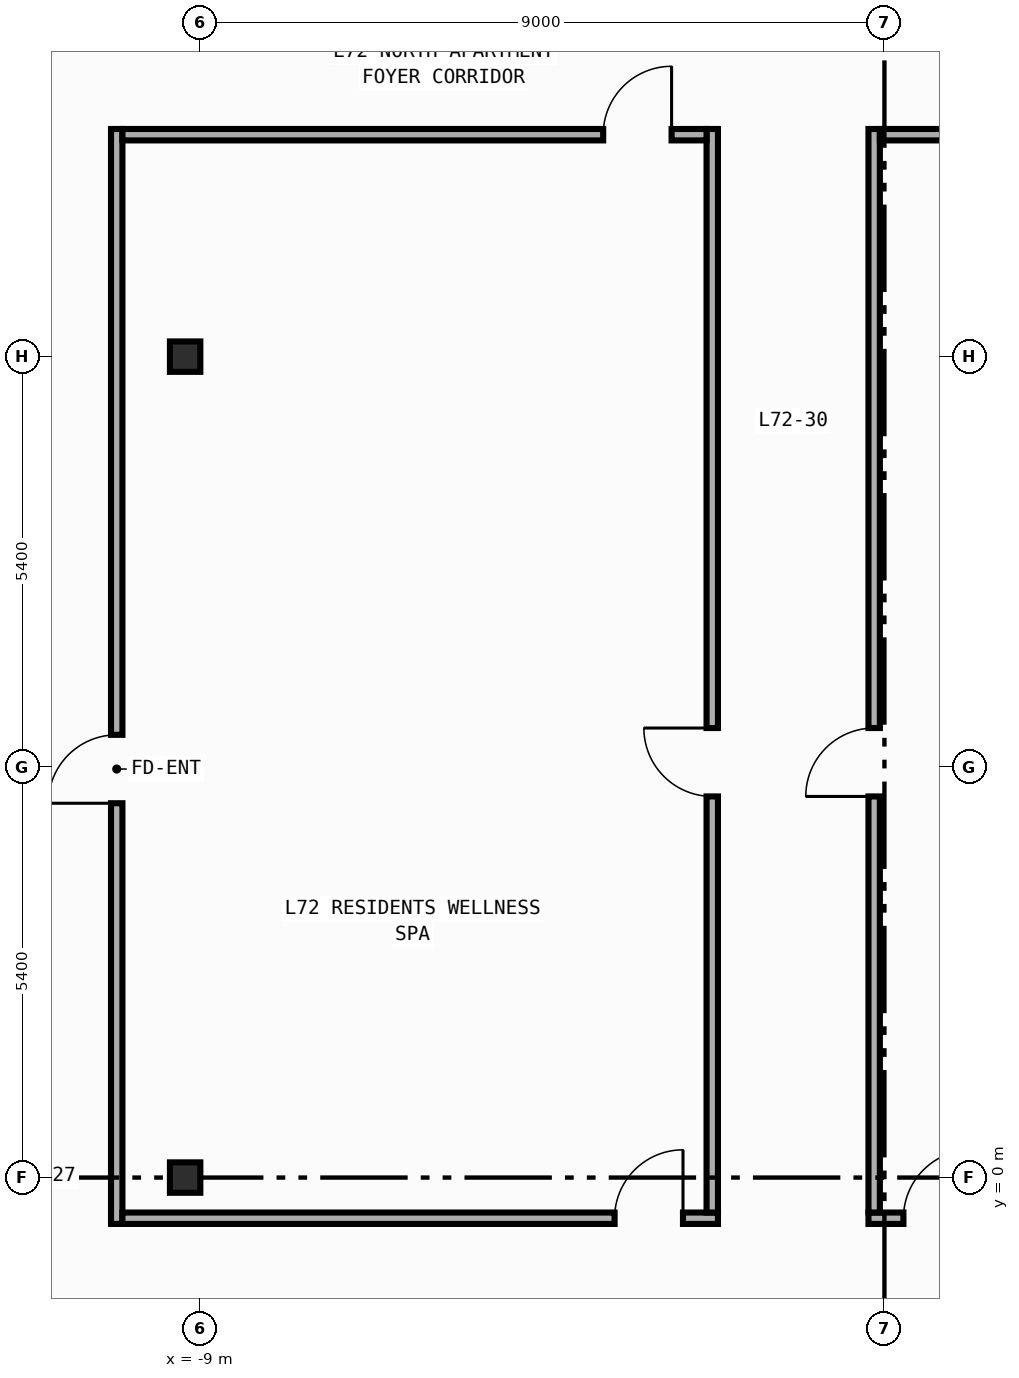
"""IFC4 building model, lengths in metres.
Left out: names, types, materials, properties, quantities, classifications, styles, units other than length and angle.
Written with IfcOpenShell. Run it as: python <this file> out.ifc"""

import sys

from ifc_helpers import new_model, si_unit, direction, frame, frame_2d, origin, origin_2d, place, context, subcontext, project, spatial, rectangle, i_section, extrude, element, fill, save


model = new_model("IFC4")
c1 = context("Model", 3, precision=1e-05, world=origin(), true_north=direction((0.0, 1.0)))
c2 = subcontext(c1, "Body", "Model", "MODEL_VIEW")
j1 = project(units=[si_unit("LENGTHUNIT", "METRE"), si_unit("PLANEANGLEUNIT", "RADIAN")], contexts=[c1])
p1 = place(None, origin())
s1 = spatial("IfcSite", under=j1, at=p1, CompositionType="ELEMENT")
p2 = place(p1, origin())
s2 = spatial("IfcBuilding", under=s1, at=p2, CompositionType="ELEMENT")
p3 = place(p2, frame((0.0, 0.0, 300.4)))
s3 = spatial("IfcBuildingStorey", under=s2, at=p3, CompositionType="ELEMENT", Elevation=300.4)
for number, where, z_axis, x_axis in (
    (1, (-9.2, 0.0, 0.0), (0.0, 0.0, 1.0), (1.0, 0.0, 0.0)),
    (2, (-9.2, 10.8, 0.0), (0.0, 0.0, 1.0), (1.0, 0.0, 0.0)),
):
    element("IfcColumn", number, at=place(p3, frame(where, z_axis=z_axis, x_axis=x_axis)), inside=s3, PredefinedType="COLUMN", context=c2, shape_type="SweptSolid", body=[
        extrude(i_section(OverallWidth=0.4, OverallDepth=0.4, WebThickness=0.013, FlangeThickness=0.021, FilletRadius=0.022, at=origin_2d()), origin(), (0.0, 0.0, 1.0), 3.8),
    ])
p4 = place(p3, frame((-10.1, -0.61, 0.0), z_axis=(0.0, 0.0, 1.0), x_axis=(0.0, 1.0, 0.0)))
e3 = element("IfcWall", 3, at=p4, inside=s3, PredefinedType="PARTITIONING", context=c2, shape_type="SweptSolid", body=[
    extrude(rectangle(XDim=14.405, YDim=0.15, at=frame_2d((7.203, 0.0))), origin(), (0.0, 0.0, 1.0), 3.54),
])
p5 = place(p4, frame((5.535, 0.0, 0.0)))
e4 = element("IfcOpeningElement", 4, at=p5, cuts=e3, PredefinedType="OPENING", context=c2, shape_type="SweptSolid", body=[
    extrude(rectangle(XDim=0.9, YDim=2.15, at=frame_2d((0.45, 1.075))), frame((0.0, 0.085, 0.0), z_axis=(0.0, -1.0, 0.0), x_axis=(1.0, 0.0, 0.0)), (0.0, 0.0, 1.0), 0.17),
])
p6 = place(p3, frame((-10.025, -0.535, 0.0), z_axis=(0.0, 0.0, 1.0), x_axis=(1.0, 0.0, 0.0)))
e5 = element("IfcWall", 5, at=p6, inside=s3, PredefinedType="PARTITIONING", context=c2, shape_type="SweptSolid", body=[
    extrude(rectangle(XDim=7.835, YDim=0.15, at=frame_2d((3.917, 0.0))), origin(), (0.0, 0.0, 1.0), 3.54),
])
p7 = place(p6, frame((6.475, 0.0, 0.0)))
e6 = element("IfcOpeningElement", 6, at=p7, cuts=e5, PredefinedType="OPENING", context=c2, shape_type="SweptSolid", body=[
    extrude(rectangle(XDim=0.9, YDim=2.15, at=frame_2d((0.45, 1.075))), frame((0.0, 0.085, 0.0), z_axis=(0.0, -1.0, 0.0), x_axis=(1.0, 0.0, 0.0)), (0.0, 0.0, 1.0), 0.17),
])
p8 = place(p3, frame((-0.21, -0.535, 0.0), z_axis=(0.0, 0.0, 1.0), x_axis=(1.0, 0.0, 0.0)))
e7 = element("IfcWall", 7, at=p8, inside=s3, PredefinedType="PARTITIONING", context=c2, shape_type="SweptSolid", body=[
    extrude(rectangle(XDim=10.235, YDim=0.15, at=frame_2d((5.117, 0.0))), origin(), (0.0, 0.0, 1.0), 3.54),
])
p9 = place(p8, frame((0.46, 0.0, 0.0)))
e8 = element("IfcOpeningElement", 8, at=p9, cuts=e7, PredefinedType="OPENING", context=c2, shape_type="SweptSolid", body=[
    extrude(rectangle(XDim=0.9, YDim=2.15, at=frame_2d((0.45, 1.075))), frame((0.0, 0.085, 0.0), z_axis=(0.0, -1.0, 0.0), x_axis=(1.0, 0.0, 0.0)), (0.0, 0.0, 1.0), 0.17),
])
p10 = place(p3, frame((-2.265, -0.46, 0.0), z_axis=(0.0, 0.0, 1.0), x_axis=(0.0, 1.0, 0.0)))
e9 = element("IfcWall", 9, at=p10, inside=s3, PredefinedType="PARTITIONING", context=c2, shape_type="SweptSolid", body=[
    extrude(rectangle(XDim=14.255, YDim=0.15, at=frame_2d((7.127, 0.0))), origin(), (0.0, 0.0, 1.0), 3.54),
])
p11 = place(p10, frame((5.474, 0.0, 0.0)))
e10 = element("IfcOpeningElement", 10, at=p11, cuts=e9, PredefinedType="OPENING", context=c2, shape_type="SweptSolid", body=[
    extrude(rectangle(XDim=0.9, YDim=2.15, at=frame_2d((0.45, 1.075))), frame((0.0, 0.085, 0.0), z_axis=(0.0, -1.0, 0.0), x_axis=(1.0, 0.0, 0.0)), (0.0, 0.0, 1.0), 0.17),
])
p12 = place(p3, frame((-0.135, -0.46, 0.0), z_axis=(0.0, 0.0, 1.0), x_axis=(0.0, 1.0, 0.0)))
e11 = element("IfcWall", 11, at=p12, inside=s3, PredefinedType="PARTITIONING", context=c2, shape_type="SweptSolid", body=[
    extrude(rectangle(XDim=14.255, YDim=0.15, at=frame_2d((7.127, 0.0))), origin(), (0.0, 0.0, 1.0), 3.54),
])
p13 = place(p12, frame((5.474, 0.0, 0.0)))
e12 = element("IfcOpeningElement", 12, at=p13, cuts=e11, PredefinedType="OPENING", context=c2, shape_type="SweptSolid", body=[
    extrude(rectangle(XDim=0.9, YDim=2.15, at=frame_2d((0.45, 1.075))), frame((0.0, 0.085, 0.0), z_axis=(0.0, -1.0, 0.0), x_axis=(1.0, 0.0, 0.0)), (0.0, 0.0, 1.0), 0.17),
])
p14 = place(p3, frame((-10.025, 13.72, 0.0), z_axis=(0.0, 0.0, 1.0), x_axis=(1.0, 0.0, 0.0)))
e13 = element("IfcWall", 13, at=p14, inside=s3, PredefinedType="PARTITIONING", context=c2, shape_type="SweptSolid", body=[
    extrude(rectangle(XDim=7.685, YDim=0.15, at=frame_2d((3.842, 0.0))), origin(), (0.0, 0.0, 1.0), 3.54),
])
p15 = place(p14, frame((6.325, 0.0, 0.0)))
e14 = element("IfcOpeningElement", 14, at=p15, cuts=e13, PredefinedType="OPENING", context=c2, shape_type="SweptSolid", body=[
    extrude(rectangle(XDim=0.9, YDim=2.15, at=frame_2d((0.45, 1.075))), frame((0.0, 0.085, 0.0), z_axis=(0.0, -1.0, 0.0), x_axis=(1.0, 0.0, 0.0)), (0.0, 0.0, 1.0), 0.17),
])
p16 = place(p3, frame((-0.06, 13.72, 0.0), z_axis=(0.0, 0.0, 1.0), x_axis=(1.0, 0.0, 0.0)))
e15 = element("IfcWall", 15, at=p16, inside=s3, PredefinedType="PARTITIONING", context=c2, shape_type="SweptSolid", body=[
    extrude(rectangle(XDim=10.085, YDim=0.15, at=frame_2d((5.042, 0.0))), origin(), (0.0, 0.0, 1.0), 3.54),
])
p17 = place(p16, frame((1.875, 0.0, 0.0)))
e16 = element("IfcOpeningElement", 16, at=p17, cuts=e15, PredefinedType="OPENING", context=c2, shape_type="SweptSolid", body=[
    extrude(rectangle(XDim=0.9, YDim=2.15, at=frame_2d((0.45, 1.075))), frame((0.0, 0.085, 0.0), z_axis=(0.0, -1.0, 0.0), x_axis=(1.0, 0.0, 0.0)), (0.0, 0.0, 1.0), 0.17),
])
p18 = place(p5, origin())
e17 = element("IfcDoor", 17, at=p18, inside=s3, OperationType="SINGLE_SWING_LEFT", PredefinedType="DOOR", context=c2, shape_type="SweptSolid", body=[
    extrude(rectangle(XDim=0.9, YDim=2.15, at=frame_2d((0.45, 1.075))), frame((0.0, 0.025, 0.0), z_axis=(0.0, -1.0, 0.0), x_axis=(1.0, 0.0, 0.0)), (0.0, 0.0, 1.0), 0.05),
])
fill(e4, e17)
p19 = place(p7, origin())
e18 = element("IfcDoor", 18, at=p19, inside=s3, OperationType="SINGLE_SWING_RIGHT", PredefinedType="DOOR", context=c2, shape_type="SweptSolid", body=[
    extrude(rectangle(XDim=0.9, YDim=2.15, at=frame_2d((0.45, 1.075))), frame((0.0, 0.025, 0.0), z_axis=(0.0, -1.0, 0.0), x_axis=(1.0, 0.0, 0.0)), (0.0, 0.0, 1.0), 0.05),
])
fill(e6, e18)
p20 = place(p9, origin())
e19 = element("IfcDoor", 19, at=p20, inside=s3, OperationType="SINGLE_SWING_RIGHT", PredefinedType="DOOR", context=c2, shape_type="SweptSolid", body=[
    extrude(rectangle(XDim=0.9, YDim=2.15, at=frame_2d((0.45, 1.075))), frame((0.0, 0.025, 0.0), z_axis=(0.0, -1.0, 0.0), x_axis=(1.0, 0.0, 0.0)), (0.0, 0.0, 1.0), 0.05),
])
fill(e8, e19)
p21 = place(p11, origin())
e20 = element("IfcDoor", 20, at=p21, inside=s3, OperationType="SINGLE_SWING_RIGHT", PredefinedType="DOOR", context=c2, shape_type="SweptSolid", body=[
    extrude(rectangle(XDim=0.9, YDim=2.15, at=frame_2d((0.45, 1.075))), frame((0.0, 0.025, 0.0), z_axis=(0.0, -1.0, 0.0), x_axis=(1.0, 0.0, 0.0)), (0.0, 0.0, 1.0), 0.05),
])
fill(e10, e20)
p22 = place(p13, origin())
e21 = element("IfcDoor", 21, at=p22, inside=s3, OperationType="SINGLE_SWING_LEFT", PredefinedType="DOOR", context=c2, shape_type="SweptSolid", body=[
    extrude(rectangle(XDim=0.9, YDim=2.15, at=frame_2d((0.45, 1.075))), frame((0.0, 0.025, 0.0), z_axis=(0.0, -1.0, 0.0), x_axis=(1.0, 0.0, 0.0)), (0.0, 0.0, 1.0), 0.05),
])
fill(e12, e21)
p23 = place(p15, origin())
e22 = element("IfcDoor", 22, at=p23, inside=s3, OperationType="SINGLE_SWING_RIGHT", PredefinedType="DOOR", context=c2, shape_type="SweptSolid", body=[
    extrude(rectangle(XDim=0.9, YDim=2.15, at=frame_2d((0.45, 1.075))), frame((0.0, 0.025, 0.0), z_axis=(0.0, -1.0, 0.0), x_axis=(1.0, 0.0, 0.0)), (0.0, 0.0, 1.0), 0.05),
])
fill(e14, e22)
save(model, sys.argv[1])
